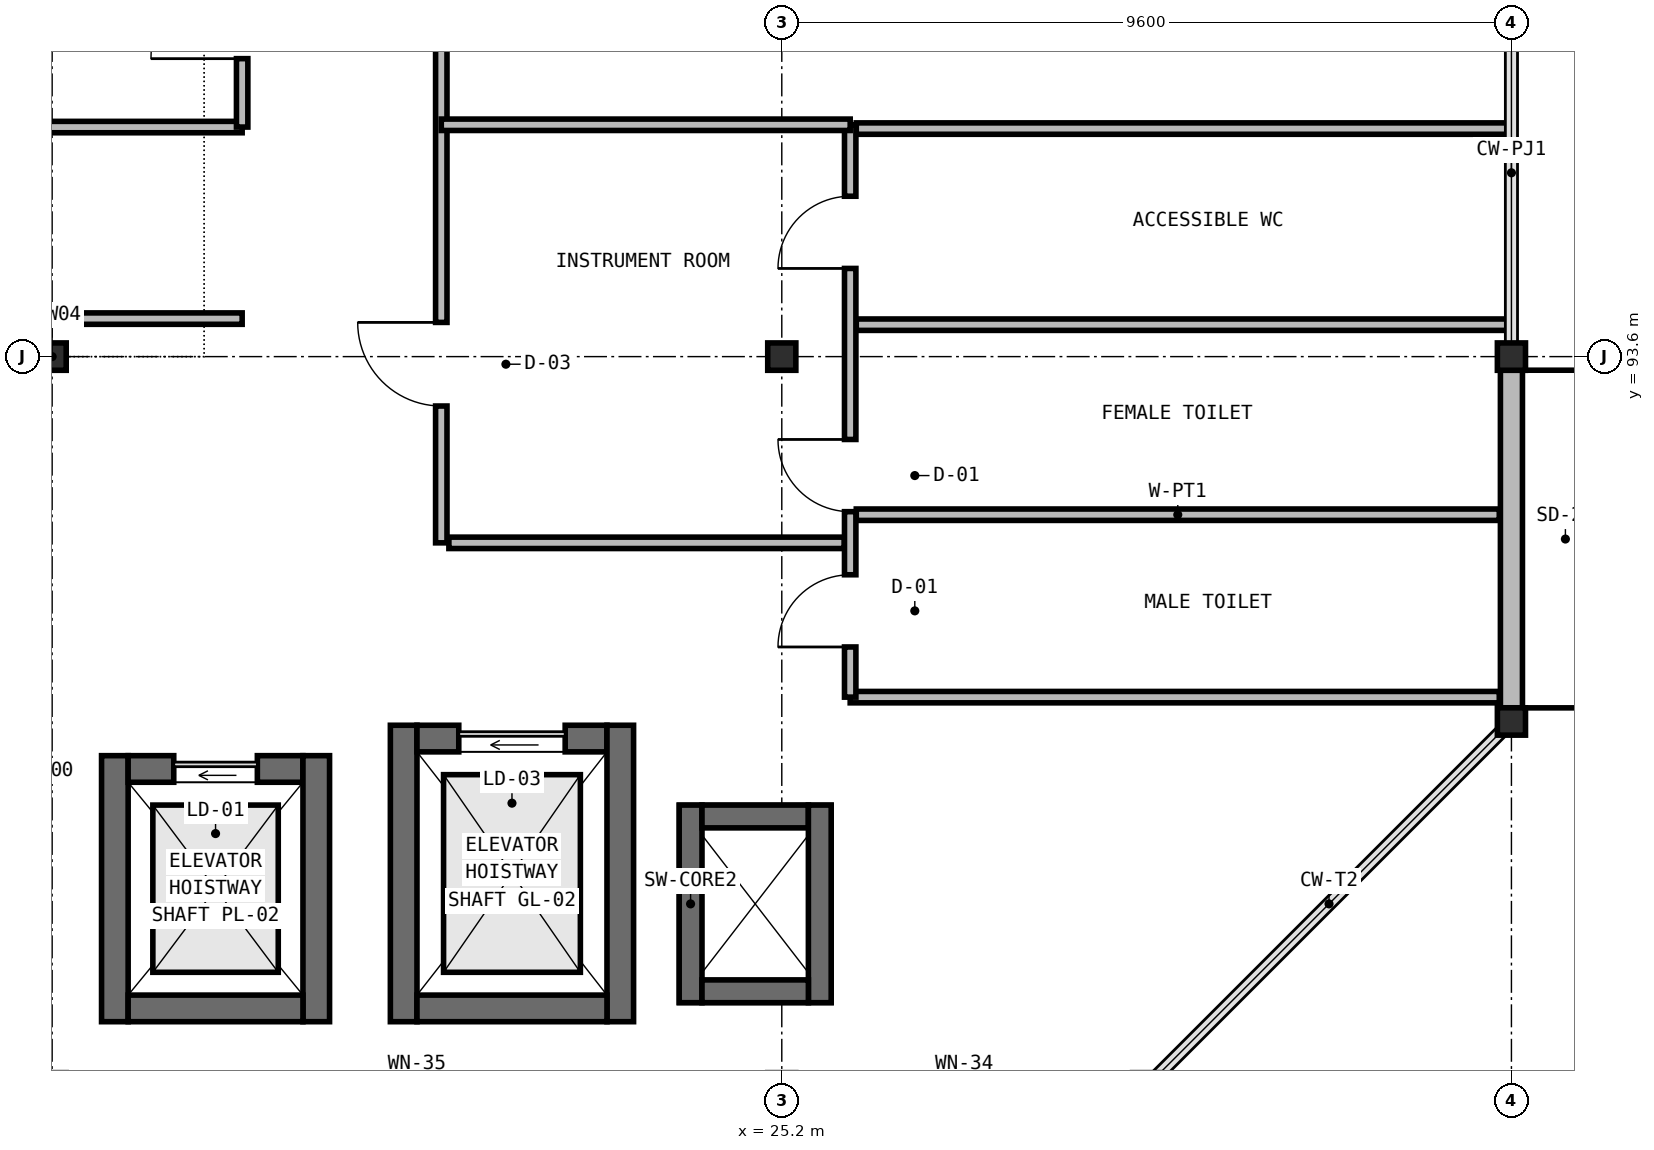
"""IFC4 building model, lengths in metres.
Left out: names, types, materials, properties, quantities, classifications, styles, units other than length and angle.
Written with IfcOpenShell. Run it as: python <this file> out.ifc"""

import sys

from ifc_helpers import new_model, si_unit, direction, frame, frame_2d, origin, origin_2d, place, context, subcontext, project, spatial, rectangle, i_section, extrude, element, fill, save


model = new_model("IFC4")
c1 = context("Model", 3, precision=1e-05, world=origin(), true_north=direction((0.0, 1.0)))
c2 = subcontext(c1, "Body", "Model", "MODEL_VIEW")
j1 = project(units=[si_unit("LENGTHUNIT", "METRE"), si_unit("PLANEANGLEUNIT", "RADIAN")], contexts=[c1])
p1 = place(None, origin())
s1 = spatial("IfcSite", under=j1, at=p1, CompositionType="ELEMENT")
p2 = place(p1, origin())
s2 = spatial("IfcBuilding", under=s1, at=p2, CompositionType="ELEMENT")
p3 = place(p2, frame((0.0, 0.0, 14.35)))
s3 = spatial("IfcBuildingStorey", under=s2, at=p3, CompositionType="ELEMENT", Elevation=14.35)
p4 = place(p3, frame((16.425, 84.85, 0.0), z_axis=(0.0, 0.0, 1.0), x_axis=(0.0, 1.0, 0.0)))
e1 = element("IfcWall", 1, at=p4, inside=s3, PredefinedType="SHEAR", context=c2, shape_type="SweptSolid", body=[
    extrude(rectangle(XDim=3.5, YDim=0.35, at=frame_2d((1.75, 0.0))), origin(), (0.0, 0.0, 1.0), 4.55),
])
p5 = place(p3, frame((16.6, 88.175, 0.0), z_axis=(0.0, 0.0, 1.0), x_axis=(1.0, 0.0, 0.0)))
e2 = element("IfcWall", 2, at=p5, inside=s3, PredefinedType="SHEAR", context=c2, shape_type="SweptSolid", body=[
    extrude(rectangle(XDim=2.3, YDim=0.35, at=frame_2d((1.15, 0.0))), origin(), (0.0, 0.0, 1.0), 4.55),
])
p6 = place(p5, frame((0.6, 0.0, 0.0)))
e3 = element("IfcOpeningElement", 3, at=p6, cuts=e2, PredefinedType="OPENING", context=c2, shape_type="SweptSolid", body=[
    extrude(rectangle(XDim=1.1, YDim=2.15, at=frame_2d((0.55, 1.075))), frame((0.0, 0.185, 0.0), z_axis=(0.0, -1.0, 0.0), x_axis=(1.0, 0.0, 0.0)), (0.0, 0.0, 1.0), 0.37),
])
p7 = place(p3, frame((19.075, 88.35, 0.0), z_axis=(0.0, 0.0, 1.0), x_axis=(0.0, -1.0, 0.0)))
e4 = element("IfcWall", 4, at=p7, inside=s3, PredefinedType="SHEAR", context=c2, shape_type="SweptSolid", body=[
    extrude(rectangle(XDim=3.5, YDim=0.35, at=frame_2d((1.75, 0.0))), origin(), (0.0, 0.0, 1.0), 4.55),
])
p8 = place(p3, frame((18.9, 85.025, 0.0), z_axis=(0.0, 0.0, 1.0), x_axis=(-1.0, 0.0, 0.0)))
e5 = element("IfcWall", 5, at=p8, inside=s3, PredefinedType="SHEAR", context=c2, shape_type="SweptSolid", body=[
    extrude(rectangle(XDim=2.3, YDim=0.35, at=frame_2d((1.15, 0.0))), origin(), (0.0, 0.0, 1.0), 4.55),
])
p9 = place(p3, frame((20.225, 84.85, 0.0), z_axis=(0.0, 0.0, 1.0), x_axis=(0.0, 1.0, 0.0)))
e6 = element("IfcWall", 6, at=p9, inside=s3, PredefinedType="SHEAR", context=c2, shape_type="SweptSolid", body=[
    extrude(rectangle(XDim=3.9, YDim=0.35, at=frame_2d((1.95, 0.0))), origin(), (0.0, 0.0, 1.0), 4.55),
])
p10 = place(p3, frame((20.4, 88.575, 0.0), z_axis=(0.0, 0.0, 1.0), x_axis=(1.0, 0.0, 0.0)))
e7 = element("IfcWall", 7, at=p10, inside=s3, PredefinedType="SHEAR", context=c2, shape_type="SweptSolid", body=[
    extrude(rectangle(XDim=2.5, YDim=0.35, at=frame_2d((1.25, 0.0))), origin(), (0.0, 0.0, 1.0), 4.55),
])
p11 = place(p10, frame((0.55, 0.0, 0.0)))
e8 = element("IfcOpeningElement", 8, at=p11, cuts=e7, PredefinedType="OPENING", context=c2, shape_type="SweptSolid", body=[
    extrude(rectangle(XDim=1.4, YDim=2.3, at=frame_2d((0.7, 1.15))), frame((0.0, 0.185, 0.0), z_axis=(0.0, -1.0, 0.0), x_axis=(1.0, 0.0, 0.0)), (0.0, 0.0, 1.0), 0.37),
])
p12 = place(p3, frame((23.075, 88.75, 0.0), z_axis=(0.0, 0.0, 1.0), x_axis=(0.0, -1.0, 0.0)))
e9 = element("IfcWall", 9, at=p12, inside=s3, PredefinedType="SHEAR", context=c2, shape_type="SweptSolid", body=[
    extrude(rectangle(XDim=3.9, YDim=0.35, at=frame_2d((1.95, 0.0))), origin(), (0.0, 0.0, 1.0), 4.55),
])
p13 = place(p3, frame((22.9, 85.025, 0.0), z_axis=(0.0, 0.0, 1.0), x_axis=(-1.0, 0.0, 0.0)))
e10 = element("IfcWall", 10, at=p13, inside=s3, PredefinedType="SHEAR", context=c2, shape_type="SweptSolid", body=[
    extrude(rectangle(XDim=2.5, YDim=0.35, at=frame_2d((1.25, 0.0))), origin(), (0.0, 0.0, 1.0), 4.55),
])
for number, where, z_axis, x_axis in (
    (11, (15.6, 93.6, 0.0), (0.0, 0.0, 1.0), (1.0, 0.0, 0.0)),
    (12, (25.2, 93.6, 0.0), (0.0, 0.0, 1.0), (1.0, 0.0, 0.0)),
    (13, (34.8, 93.6, 0.0), (0.0, 0.0, 1.0), (1.0, 0.0, 0.0)),
    (14, (34.8, 88.8, 0.0), (0.0, 0.0, 1.0), (1.0, 0.0, 0.0)),
):
    element("IfcColumn", number, at=place(p3, frame(where, z_axis=z_axis, x_axis=x_axis)), inside=s3, PredefinedType="COLUMN", context=c2, shape_type="SweptSolid", body=[
        extrude(i_section(OverallWidth=0.37, OverallDepth=0.36, WebThickness=0.014, FlangeThickness=0.022, at=origin_2d()), origin(), (0.0, 0.0, 1.0), 4.55),
    ])
p14 = place(p3, frame((24.0, 85.1, 0.0), z_axis=(0.0, 0.0, 1.0), x_axis=(0.0, 1.0, 0.0)))
e15 = element("IfcWall", 15, at=p14, inside=s3, PredefinedType="SHEAR", context=c2, shape_type="SweptSolid", body=[
    extrude(rectangle(XDim=2.6, YDim=0.3, at=frame_2d((1.3, 0.0))), origin(), (0.0, 0.0, 1.0), 4.37),
])
p15 = place(p3, frame((24.15, 87.55, 0.0), z_axis=(0.0, 0.0, 1.0), x_axis=(1.0, 0.0, 0.0)))
e16 = element("IfcWall", 16, at=p15, inside=s3, PredefinedType="SHEAR", context=c2, shape_type="SweptSolid", body=[
    extrude(rectangle(XDim=1.4, YDim=0.3, at=frame_2d((0.7, 0.0))), origin(), (0.0, 0.0, 1.0), 4.37),
])
p16 = place(p3, frame((25.7, 87.7, 0.0), z_axis=(0.0, 0.0, 1.0), x_axis=(0.0, -1.0, 0.0)))
e17 = element("IfcWall", 17, at=p16, inside=s3, PredefinedType="SHEAR", context=c2, shape_type="SweptSolid", body=[
    extrude(rectangle(XDim=2.6, YDim=0.3, at=frame_2d((1.3, 0.0))), origin(), (0.0, 0.0, 1.0), 4.37),
])
p17 = place(p3, frame((25.55, 85.25, 0.0), z_axis=(0.0, 0.0, 1.0), x_axis=(-1.0, 0.0, 0.0)))
e18 = element("IfcWall", 18, at=p17, inside=s3, PredefinedType="SHEAR", context=c2, shape_type="SweptSolid", body=[
    extrude(rectangle(XDim=1.4, YDim=0.3, at=frame_2d((0.7, 0.0))), origin(), (0.0, 0.0, 1.0), 4.37),
])
p18 = place(p3, frame((34.8, 93.596, 0.0), z_axis=(0.0, 0.0, 1.0), x_axis=(0.0, -1.0, 0.0)))
e19 = element("IfcWall", 19, at=p18, inside=s3, PredefinedType="SOLIDWALL", context=c2, shape_type="SweptSolid", body=[
    extrude(rectangle(XDim=4.792, YDim=0.29, at=frame_2d((2.396, 0.0))), origin(), (0.0, 0.0, 1.0), 4.37),
])
p19 = place(p3, frame((26.18, 91.52, 0.0), z_axis=(0.0, 0.0, 1.0), x_axis=(1.0, 0.0, 0.0)))
e20 = element("IfcWall", 20, at=p19, inside=s3, PredefinedType="PARTITIONING", context=c2, shape_type="SweptSolid", body=[
    extrude(rectangle(XDim=8.46, YDim=0.15, at=frame_2d((4.23, 0.0))), origin(), (0.0, 0.0, 1.0), 4.3),
])
for number, where, z_axis, x_axis in (
    (21, (26.18, 94.02, 0.0), (0.0, 0.0, 1.0), (1.0, 0.0, 0.0)),
    (22, (26.18, 96.6, 0.0), (0.0, 0.0, 1.0), (1.0, 0.0, 0.0)),
):
    element("IfcWall", number, at=place(p3, frame(where, z_axis=z_axis, x_axis=x_axis)), inside=s3, PredefinedType="PARTITIONING", context=c2, shape_type="SweptSolid", body=[
        extrude(rectangle(XDim=8.56, YDim=0.15, at=frame_2d((4.28, 0.0))), origin(), (0.0, 0.0, 1.0), 4.3),
    ])
p20 = place(p3, frame((26.1, 89.12, 0.0), z_axis=(0.0, 0.0, 1.0), x_axis=(1.0, 0.0, 0.0)))
e23 = element("IfcWall", 23, at=p20, inside=s3, PredefinedType="PARTITIONING", context=c2, shape_type="SweptSolid", body=[
    extrude(rectangle(XDim=8.54, YDim=0.15, at=frame_2d((4.27, 0.0))), origin(), (0.0, 0.0, 1.0), 4.3),
])
p21 = place(p3, frame((26.1, 89.12, 0.0), z_axis=(0.0, 0.0, 1.0), x_axis=(0.0, 1.0, 0.0)))
e24 = element("IfcWall", 24, at=p21, inside=s3, PredefinedType="PARTITIONING", context=c2, shape_type="SweptSolid", body=[
    extrude(rectangle(XDim=7.53, YDim=0.15, at=frame_2d((3.765, 0.0))), origin(), (0.0, 0.0, 1.0), 4.3),
])
p22 = place(p21, frame((0.66, 0.0, 0.0)))
e25 = element("IfcOpeningElement", 25, at=p22, cuts=e24, PredefinedType="OPENING", context=c2, shape_type="SweptSolid", body=[
    extrude(rectangle(XDim=0.95, YDim=2.1, at=frame_2d((0.475, 1.05))), frame((0.0, 0.085, 0.0), z_axis=(0.0, -1.0, 0.0), x_axis=(1.0, 0.0, 0.0)), (0.0, 0.0, 1.0), 0.17),
])
p23 = place(p21, frame((2.44, 0.0, 0.0)))
e26 = element("IfcOpeningElement", 26, at=p23, cuts=e24, PredefinedType="OPENING", context=c2, shape_type="SweptSolid", body=[
    extrude(rectangle(XDim=0.95, YDim=2.1, at=frame_2d((0.475, 1.05))), frame((0.0, 0.085, 0.0), z_axis=(0.0, -1.0, 0.0), x_axis=(1.0, 0.0, 0.0)), (0.0, 0.0, 1.0), 0.17),
])
p24 = place(p21, frame((5.64, 0.0, 0.0)))
e27 = element("IfcOpeningElement", 27, at=p24, cuts=e24, PredefinedType="OPENING", context=c2, shape_type="SweptSolid", body=[
    extrude(rectangle(XDim=0.95, YDim=2.1, at=frame_2d((0.475, 1.05))), frame((0.0, 0.085, 0.0), z_axis=(0.0, -1.0, 0.0), x_axis=(1.0, 0.0, 0.0)), (0.0, 0.0, 1.0), 0.17),
])
p25 = place(p3, frame((6.16, 96.62, 0.0), z_axis=(0.0, 0.0, 1.0), x_axis=(1.0, 0.0, 0.0)))
e28 = element("IfcWall", 28, at=p25, inside=s3, PredefinedType="PARTITIONING", context=c2, shape_type="SweptSolid", body=[
    extrude(rectangle(XDim=11.94, YDim=0.15, at=frame_2d((5.97, 0.0))), origin(), (0.0, 0.0, 1.0), 4.3),
])
p26 = place(p3, frame((11.02, 94.1, 0.0), z_axis=(0.0, 0.0, 1.0), x_axis=(1.0, 0.0, 0.0)))
e29 = element("IfcWall", 29, at=p26, inside=s3, PredefinedType="PARTITIONING", context=c2, shape_type="SweptSolid", body=[
    extrude(rectangle(XDim=7.08, YDim=0.15, at=frame_2d((3.54, 0.0))), origin(), (0.0, 0.0, 1.0), 4.3),
])
p27 = place(p3, frame((18.1, 96.62, 0.0), z_axis=(0.0, 0.0, 1.0), x_axis=(0.0, 1.0, 0.0)))
e30 = element("IfcWall", 30, at=p27, inside=s3, PredefinedType="PARTITIONING", context=c2, shape_type="SweptSolid", body=[
    extrude(rectangle(XDim=20.82, YDim=0.15, at=frame_2d((10.41, 0.0))), origin(), (0.0, 0.0, 1.0), 4.3),
])
p28 = place(p27, frame((0.9, 0.0, 0.0)))
e31 = element("IfcOpeningElement", 31, at=p28, cuts=e30, PredefinedType="OPENING", context=c2, shape_type="SweptSolid", body=[
    extrude(rectangle(XDim=1.2, YDim=2.2, at=frame_2d((0.6, 1.1))), frame((0.0, 0.085, 0.0), z_axis=(0.0, -1.0, 0.0), x_axis=(1.0, 0.0, 0.0)), (0.0, 0.0, 1.0), 0.17),
])
p29 = place(p27, frame((4.2, 0.0, 0.0)))
e32 = element("IfcOpeningElement", 32, at=p29, cuts=e30, PredefinedType="OPENING", context=c2, shape_type="SweptSolid", body=[
    extrude(rectangle(XDim=1.2, YDim=2.2, at=frame_2d((0.6, 1.1))), frame((0.0, 0.085, 0.0), z_axis=(0.0, -1.0, 0.0), x_axis=(1.0, 0.0, 0.0)), (0.0, 0.0, 1.0), 0.17),
])
p30 = place(p27, frame((9.4, 0.0, 0.0)))
e33 = element("IfcOpeningElement", 33, at=p30, cuts=e30, PredefinedType="OPENING", context=c2, shape_type="SweptSolid", body=[
    extrude(rectangle(XDim=1.0, YDim=2.2, at=frame_2d((0.5, 1.1))), frame((0.0, 0.085, 0.0), z_axis=(0.0, -1.0, 0.0), x_axis=(1.0, 0.0, 0.0)), (0.0, 0.0, 1.0), 0.17),
])
p31 = place(p3, frame((20.72, 91.15, 0.0), z_axis=(0.0, 0.0, 1.0), x_axis=(0.0, 1.0, 0.0)))
e34 = element("IfcWall", 34, at=p31, inside=s3, PredefinedType="PARTITIONING", context=c2, shape_type="SweptSolid", body=[
    extrude(rectangle(XDim=12.8, YDim=0.15, at=frame_2d((6.4, 0.0))), origin(), (0.0, 0.0, 1.0), 4.3),
])
p32 = place(p31, frame((1.8, 0.0, 0.0)))
e35 = element("IfcOpeningElement", 35, at=p32, cuts=e34, PredefinedType="OPENING", context=c2, shape_type="SweptSolid", body=[
    extrude(rectangle(XDim=1.1, YDim=2.2, at=frame_2d((0.55, 1.1))), frame((0.0, 0.085, 0.0), z_axis=(0.0, -1.0, 0.0), x_axis=(1.0, 0.0, 0.0)), (0.0, 0.0, 1.0), 0.17),
])
p33 = place(p31, frame((6.8, 0.0, 0.0)))
e36 = element("IfcOpeningElement", 36, at=p33, cuts=e34, PredefinedType="OPENING", context=c2, shape_type="SweptSolid", body=[
    extrude(rectangle(XDim=1.2, YDim=2.2, at=frame_2d((0.6, 1.1))), frame((0.0, 0.085, 0.0), z_axis=(0.0, -1.0, 0.0), x_axis=(1.0, 0.0, 0.0)), (0.0, 0.0, 1.0), 0.17),
])
p34 = place(p3, frame((20.82, 91.15, 0.0), z_axis=(0.0, 0.0, 1.0), x_axis=(1.0, 0.0, 0.0)))
e37 = element("IfcWall", 37, at=p34, inside=s3, PredefinedType="PARTITIONING", context=c2, shape_type="SweptSolid", body=[
    extrude(rectangle(XDim=5.2, YDim=0.15, at=frame_2d((2.6, 0.0))), origin(), (0.0, 0.0, 1.0), 4.3),
])
p35 = place(p3, frame((20.72, 96.65, 0.0), z_axis=(0.0, 0.0, 1.0), x_axis=(1.0, 0.0, 0.0)))
e38 = element("IfcWall", 38, at=p35, inside=s3, PredefinedType="PARTITIONING", context=c2, shape_type="SweptSolid", body=[
    extrude(rectangle(XDim=5.38, YDim=0.15, at=frame_2d((2.69, 0.0))), origin(), (0.0, 0.0, 1.0), 4.3),
])
p36 = place(p6, origin())
e39 = element("IfcDoor", 39, at=p36, inside=s3, OperationType="SLIDING_TO_LEFT", PredefinedType="USERDEFINED", context=c2, shape_type="SweptSolid", body=[
    extrude(rectangle(XDim=1.1, YDim=2.15, at=frame_2d((0.55, 1.075))), frame((0.0, 0.025, 0.0), z_axis=(0.0, -1.0, 0.0), x_axis=(1.0, 0.0, 0.0)), (0.0, 0.0, 1.0), 0.05),
])
fill(e3, e39)
p37 = place(p11, origin())
e40 = element("IfcDoor", 40, at=p37, inside=s3, OperationType="SLIDING_TO_LEFT", PredefinedType="USERDEFINED", context=c2, shape_type="SweptSolid", body=[
    extrude(rectangle(XDim=1.4, YDim=2.3, at=frame_2d((0.7, 1.15))), frame((0.0, 0.025, 0.0), z_axis=(0.0, -1.0, 0.0), x_axis=(1.0, 0.0, 0.0)), (0.0, 0.0, 1.0), 0.05),
])
fill(e8, e40)
p38 = place(p22, origin())
e41 = element("IfcDoor", 41, at=p38, inside=s3, OperationType="SINGLE_SWING_LEFT", PredefinedType="DOOR", context=c2, shape_type="SweptSolid", body=[
    extrude(rectangle(XDim=0.95, YDim=2.1, at=frame_2d((0.475, 1.05))), frame((0.0, 0.025, 0.0), z_axis=(0.0, -1.0, 0.0), x_axis=(1.0, 0.0, 0.0)), (0.0, 0.0, 1.0), 0.05),
])
fill(e25, e41)
p39 = place(p23, origin())
e42 = element("IfcDoor", 42, at=p39, inside=s3, OperationType="SINGLE_SWING_RIGHT", PredefinedType="DOOR", context=c2, shape_type="SweptSolid", body=[
    extrude(rectangle(XDim=0.95, YDim=2.1, at=frame_2d((0.475, 1.05))), frame((0.0, 0.025, 0.0), z_axis=(0.0, -1.0, 0.0), x_axis=(1.0, 0.0, 0.0)), (0.0, 0.0, 1.0), 0.05),
])
fill(e26, e42)
p40 = place(p24, origin())
e43 = element("IfcDoor", 43, at=p40, inside=s3, OperationType="SINGLE_SWING_LEFT", PredefinedType="DOOR", context=c2, shape_type="SweptSolid", body=[
    extrude(rectangle(XDim=0.95, YDim=2.1, at=frame_2d((0.475, 1.05))), frame((0.0, 0.025, 0.0), z_axis=(0.0, -1.0, 0.0), x_axis=(1.0, 0.0, 0.0)), (0.0, 0.0, 1.0), 0.05),
])
fill(e27, e43)
p41 = place(p28, origin())
e44 = element("IfcDoor", 44, at=p41, inside=s3, OperationType="SINGLE_SWING_LEFT", PredefinedType="DOOR", context=c2, shape_type="SweptSolid", body=[
    extrude(rectangle(XDim=1.2, YDim=2.2, at=frame_2d((0.6, 1.1))), frame((0.0, 0.025, 0.0), z_axis=(0.0, -1.0, 0.0), x_axis=(1.0, 0.0, 0.0)), (0.0, 0.0, 1.0), 0.05),
])
fill(e31, e44)
p42 = place(p32, origin())
e45 = element("IfcDoor", 45, at=p42, inside=s3, OperationType="SINGLE_SWING_RIGHT", PredefinedType="DOOR", context=c2, shape_type="SweptSolid", body=[
    extrude(rectangle(XDim=1.1, YDim=2.2, at=frame_2d((0.55, 1.1))), frame((0.0, 0.025, 0.0), z_axis=(0.0, -1.0, 0.0), x_axis=(1.0, 0.0, 0.0)), (0.0, 0.0, 1.0), 0.05),
])
fill(e35, e45)
save(model, sys.argv[1])
